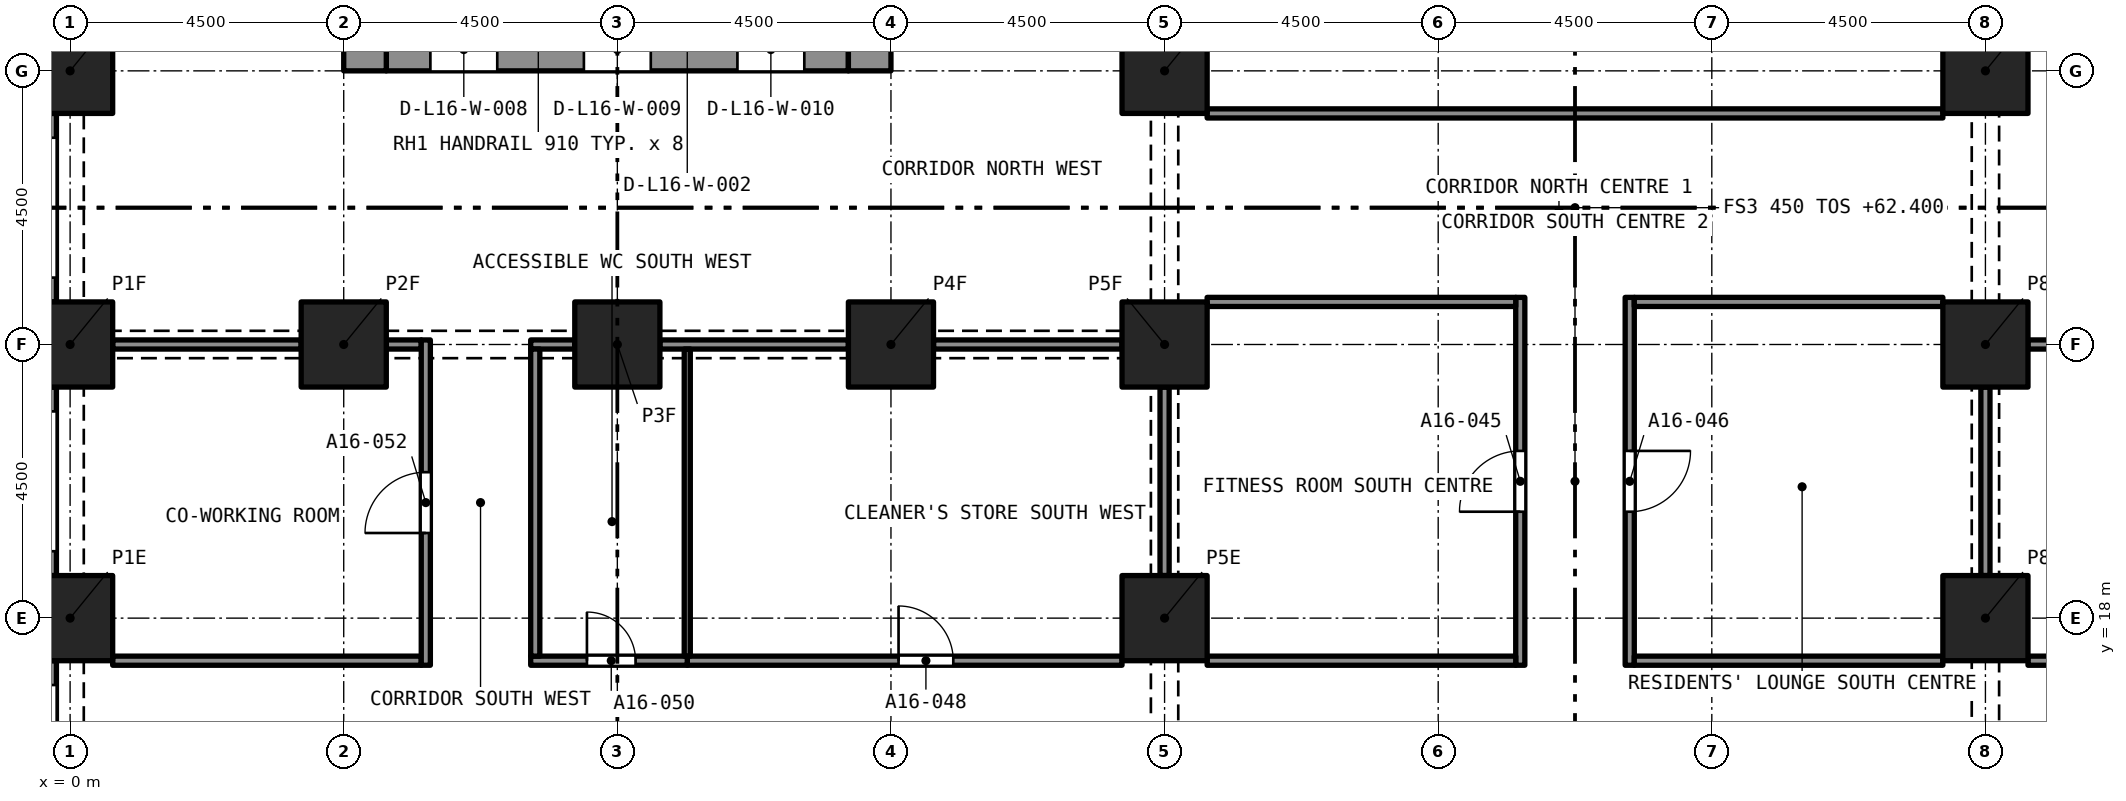
"""IFC4 building model, lengths in metres.
Left out: names, types, materials, properties, quantities, classifications, styles, units other than length and angle.
Written with IfcOpenShell. Run it as: python <this file> out.ifc"""

import sys

from ifc_helpers import new_model, si_unit, direction, frame, frame_2d, origin, origin_2d, place, context, subcontext, project, spatial, rectangle, extrude, element, fill, save


model = new_model("IFC4")
c1 = context("Model", 3, precision=1e-05, world=origin(), true_north=direction((0.0, 1.0)))
c2 = subcontext(c1, "Body", "Model", "MODEL_VIEW")
j1 = project(units=[si_unit("LENGTHUNIT", "METRE"), si_unit("PLANEANGLEUNIT", "RADIAN")], contexts=[c1])
p1 = place(None, origin())
s1 = spatial("IfcSite", under=j1, at=p1, CompositionType="ELEMENT")
p2 = place(p1, origin())
s2 = spatial("IfcBuilding", under=s1, at=p2, CompositionType="ELEMENT")
p3 = place(p2, frame((0.0, 0.0, 62.4)))
s3 = spatial("IfcBuildingStorey", under=s2, at=p3, CompositionType="ELEMENT", Elevation=62.4)
for number, where, z_axis, x_axis in (
    (1, (0.0, 18.0, 0.0), (0.0, 0.0, 1.0), (1.0, 0.0, 0.0)),
    (2, (18.0, 18.0, 0.0), (0.0, 0.0, 1.0), (1.0, 0.0, 0.0)),
    (3, (31.5, 18.0, 0.0), (0.0, 0.0, 1.0), (1.0, 0.0, 0.0)),
    (4, (0.0, 22.5, 0.0), (0.0, 0.0, 1.0), (1.0, 0.0, 0.0)),
    (5, (4.5, 22.5, 0.0), (0.0, 0.0, 1.0), (1.0, 0.0, 0.0)),
    (6, (9.0, 22.5, 0.0), (0.0, 0.0, 1.0), (1.0, 0.0, 0.0)),
    (7, (13.5, 22.5, 0.0), (0.0, 0.0, 1.0), (1.0, 0.0, 0.0)),
    (8, (18.0, 22.5, 0.0), (0.0, 0.0, 1.0), (1.0, 0.0, 0.0)),
    (9, (31.5, 22.5, 0.0), (0.0, 0.0, 1.0), (1.0, 0.0, 0.0)),
    (10, (0.0, 27.0, 0.0), (0.0, 0.0, 1.0), (1.0, 0.0, 0.0)),
    (11, (18.0, 27.0, 0.0), (0.0, 0.0, 1.0), (1.0, 0.0, 0.0)),
    (12, (31.5, 27.0, 0.0), (0.0, 0.0, 1.0), (1.0, 0.0, 0.0)),
):
    element("IfcColumn", number, at=place(p3, frame(where, z_axis=z_axis, x_axis=x_axis)), inside=s3, PredefinedType="COLUMN", context=c2, shape_type="SweptSolid", body=[
        extrude(rectangle(XDim=1.4, YDim=1.4, at=origin_2d()), origin(), (0.0, 0.0, 1.0), 3.2),
    ])
p4 = place(p3, frame((5.2, 27.35, 0.0), z_axis=(0.0, 0.0, 1.0), x_axis=(1.0, 0.0, 0.0)))
e13 = element("IfcWall", 13, at=p4, inside=s3, PredefinedType="SOLIDWALL", context=c2, shape_type="SweptSolid", body=[
    extrude(rectangle(XDim=7.6, YDim=0.7, at=frame_2d((3.8, 0.0))), origin(), (0.0, 0.0, 1.0), 3.2),
])
p5 = place(p4, frame((0.725, 0.0, 0.0)))
e14 = element("IfcOpeningElement", 14, at=p5, cuts=e13, PredefinedType="OPENING", context=c2, shape_type="SweptSolid", body=[
    extrude(rectangle(XDim=1.1, YDim=2.1, at=frame_2d((0.55, 1.05))), frame((0.0, 0.36, 0.0), z_axis=(0.0, -1.0, 0.0), x_axis=(1.0, 0.0, 0.0)), (0.0, 0.0, 1.0), 0.72),
])
p6 = place(p4, frame((3.25, 0.0, 0.0)))
e15 = element("IfcOpeningElement", 15, at=p6, cuts=e13, PredefinedType="OPENING", context=c2, shape_type="SweptSolid", body=[
    extrude(rectangle(XDim=1.1, YDim=2.1, at=frame_2d((0.55, 1.05))), frame((0.0, 0.36, 0.0), z_axis=(0.0, -1.0, 0.0), x_axis=(1.0, 0.0, 0.0)), (0.0, 0.0, 1.0), 0.72),
])
p7 = place(p4, frame((5.775, 0.0, 0.0)))
e16 = element("IfcOpeningElement", 16, at=p7, cuts=e13, PredefinedType="OPENING", context=c2, shape_type="SweptSolid", body=[
    extrude(rectangle(XDim=1.1, YDim=2.1, at=frame_2d((0.55, 1.05))), frame((0.0, 0.36, 0.0), z_axis=(0.0, -1.0, 0.0), x_axis=(1.0, 0.0, 0.0)), (0.0, 0.0, 1.0), 0.72),
])
p8 = place(p3, frame((4.85, 27.0, 0.0), z_axis=(0.0, 0.0, 1.0), x_axis=(0.0, 1.0, 0.0)))
e17 = element("IfcWall", 17, at=p8, inside=s3, PredefinedType="SOLIDWALL", context=c2, shape_type="SweptSolid", body=[
    extrude(rectangle(XDim=13.5, YDim=0.7, at=frame_2d((6.75, 0.0))), origin(), (0.0, 0.0, 1.0), 3.2),
])
p9 = place(p8, frame((8.95, 0.0, 0.0)))
e18 = element("IfcOpeningElement", 18, at=p9, cuts=e17, PredefinedType="OPENING", context=c2, shape_type="SweptSolid", body=[
    extrude(rectangle(XDim=1.2, YDim=2.1, at=frame_2d((0.6, 1.05))), frame((0.0, 0.36, 0.0), z_axis=(0.0, -1.0, 0.0), x_axis=(1.0, 0.0, 0.0)), (0.0, 0.0, 1.0), 0.72),
])
p10 = place(p3, frame((13.15, 27.0, 0.0), z_axis=(0.0, 0.0, 1.0), x_axis=(0.0, 1.0, 0.0)))
e19 = element("IfcWall", 19, at=p10, inside=s3, PredefinedType="SOLIDWALL", context=c2, shape_type="SweptSolid", body=[
    extrude(rectangle(XDim=13.5, YDim=0.7, at=frame_2d((6.75, 0.0))), origin(), (0.0, 0.0, 1.0), 3.2),
])
p11 = place(p10, frame((11.1, 0.0, 0.0)))
e20 = element("IfcOpeningElement", 20, at=p11, cuts=e19, PredefinedType="OPENING", context=c2, shape_type="SweptSolid", body=[
    extrude(rectangle(XDim=1.1, YDim=2.1, at=frame_2d((0.55, 1.05))), frame((0.0, 0.36, 0.0), z_axis=(0.0, -1.0, 0.0), x_axis=(1.0, 0.0, 0.0)), (0.0, 0.0, 1.0), 0.72),
])
p12 = place(p10, frame((8.95, 0.0, 0.0)))
e21 = element("IfcOpeningElement", 21, at=p12, cuts=e19, PredefinedType="OPENING", context=c2, shape_type="SweptSolid", body=[
    extrude(rectangle(XDim=1.2, YDim=2.1, at=frame_2d((0.6, 1.05))), frame((0.0, 0.36, 0.0), z_axis=(0.0, -1.0, 0.0), x_axis=(1.0, 0.0, 0.0)), (0.0, 0.0, 1.0), 0.72),
])
p13 = place(p3, frame((-0.375, 23.2, 0.0), z_axis=(0.0, 0.0, 1.0), x_axis=(0.0, 1.0, 0.0)))
e22 = element("IfcWall", 22, at=p13, inside=s3, PredefinedType="SOLIDWALL", context=c2, shape_type="SweptSolid", body=[
    extrude(rectangle(XDim=3.1, YDim=0.3, at=frame_2d((1.55, 0.0))), origin(), (0.0, 0.0, 1.0), 3.2),
])
p14 = place(p13, frame((0.4, 0.0, 0.45)))
e23 = element("IfcOpeningElement", 23, at=p14, cuts=e22, PredefinedType="OPENING", context=c2, shape_type="SweptSolid", body=[
    extrude(rectangle(XDim=2.3, YDim=1.95, at=frame_2d((1.15, 0.975))), frame((0.0, 0.16, 0.0), z_axis=(0.0, -1.0, 0.0), x_axis=(1.0, 0.0, 0.0)), (0.0, 0.0, 1.0), 0.32),
])
p15 = place(p3, frame((-0.375, 18.7, 0.0), z_axis=(0.0, 0.0, 1.0), x_axis=(0.0, 1.0, 0.0)))
e24 = element("IfcWall", 24, at=p15, inside=s3, PredefinedType="SOLIDWALL", context=c2, shape_type="SweptSolid", body=[
    extrude(rectangle(XDim=3.1, YDim=0.3, at=frame_2d((1.55, 0.0))), origin(), (0.0, 0.0, 1.0), 3.2),
])
p16 = place(p15, frame((0.4, 0.0, 0.45)))
e25 = element("IfcOpeningElement", 25, at=p16, cuts=e24, PredefinedType="OPENING", context=c2, shape_type="SweptSolid", body=[
    extrude(rectangle(XDim=2.3, YDim=1.95, at=frame_2d((1.15, 0.975))), frame((0.0, 0.16, 0.0), z_axis=(0.0, -1.0, 0.0), x_axis=(1.0, 0.0, 0.0)), (0.0, 0.0, 1.0), 0.32),
])
p17 = place(p3, frame((-0.375, 14.2, 0.0), z_axis=(0.0, 0.0, 1.0), x_axis=(0.0, 1.0, 0.0)))
e26 = element("IfcWall", 26, at=p17, inside=s3, PredefinedType="SOLIDWALL", context=c2, shape_type="SweptSolid", body=[
    extrude(rectangle(XDim=3.1, YDim=0.3, at=frame_2d((1.55, 0.0))), origin(), (0.0, 0.0, 1.0), 3.2),
])
p18 = place(p17, frame((0.4, 0.0, 0.45)))
e27 = element("IfcOpeningElement", 27, at=p18, cuts=e26, PredefinedType="OPENING", context=c2, shape_type="SweptSolid", body=[
    extrude(rectangle(XDim=2.3, YDim=1.95, at=frame_2d((1.15, 0.975))), frame((0.0, 0.16, 0.0), z_axis=(0.0, -1.0, 0.0), x_axis=(1.0, 0.0, 0.0)), (0.0, 0.0, 1.0), 0.32),
])
p19 = place(p3, frame((23.85, 17.225, 0.0), z_axis=(0.0, 0.0, 1.0), x_axis=(0.0, 1.0, 0.0)))
e28 = element("IfcWall", 28, at=p19, inside=s3, PredefinedType="PARTITIONING", context=c2, shape_type="SweptSolid", body=[
    extrude(rectangle(XDim=6.05, YDim=0.15, at=frame_2d((3.025, 0.0))), origin(), (0.0, 0.0, 1.0), 2.75),
])
p20 = place(p19, frame((2.525, 0.0, 0.0)))
e29 = element("IfcOpeningElement", 29, at=p20, cuts=e28, PredefinedType="OPENING", context=c2, shape_type="SweptSolid", body=[
    extrude(rectangle(XDim=1.0, YDim=2.1, at=frame_2d((0.5, 1.05))), frame((0.0, 0.085, 0.0), z_axis=(0.0, -1.0, 0.0), x_axis=(1.0, 0.0, 0.0)), (0.0, 0.0, 1.0), 0.17),
])
p21 = place(p3, frame((25.65, 23.275, 0.0), z_axis=(0.0, 0.0, 1.0), x_axis=(0.0, -1.0, 0.0)))
e30 = element("IfcWall", 30, at=p21, inside=s3, PredefinedType="PARTITIONING", context=c2, shape_type="SweptSolid", body=[
    extrude(rectangle(XDim=6.05, YDim=0.15, at=frame_2d((3.025, 0.0))), origin(), (0.0, 0.0, 1.0), 2.75),
])
p22 = place(p21, frame((2.525, 0.0, 0.0)))
e31 = element("IfcOpeningElement", 31, at=p22, cuts=e30, PredefinedType="OPENING", context=c2, shape_type="SweptSolid", body=[
    extrude(rectangle(XDim=1.0, YDim=2.1, at=frame_2d((0.5, 1.05))), frame((0.0, 0.085, 0.0), z_axis=(0.0, -1.0, 0.0), x_axis=(1.0, 0.0, 0.0)), (0.0, 0.0, 1.0), 0.17),
])
for number, where, z_axis, x_axis in (
    (32, (18.7, 17.3, 0.0), (0.0, 0.0, 1.0), (1.0, 0.0, 0.0)),
    (33, (25.725, 17.3, 0.0), (0.0, 0.0, 1.0), (1.0, 0.0, 0.0)),
):
    element("IfcWall", number, at=place(p3, frame(where, z_axis=z_axis, x_axis=x_axis)), inside=s3, PredefinedType="PARTITIONING", context=c2, shape_type="SweptSolid", body=[
        extrude(rectangle(XDim=5.075, YDim=0.15, at=frame_2d((2.538, 0.0))), origin(), (0.0, 0.0, 1.0), 2.75),
    ])
p23 = place(p3, frame((32.2, 17.3, 0.0), z_axis=(0.0, 0.0, 1.0), x_axis=(1.0, 0.0, 0.0)))
e34 = element("IfcWall", 34, at=p23, inside=s3, PredefinedType="PARTITIONING", context=c2, shape_type="SweptSolid", body=[
    extrude(rectangle(XDim=7.15, YDim=0.15, at=frame_2d((3.575, 0.0))), origin(), (0.0, 0.0, 1.0), 2.9),
])
p24 = place(p23, frame((2.775, 0.0, 0.0)))
e35 = element("IfcOpeningElement", 35, at=p24, cuts=e34, PredefinedType="OPENING", context=c2, shape_type="SweptSolid", body=[
    extrude(rectangle(XDim=0.9, YDim=2.1, at=frame_2d((0.45, 1.05))), frame((0.0, 0.085, 0.0), z_axis=(0.0, -1.0, 0.0), x_axis=(1.0, 0.0, 0.0)), (0.0, 0.0, 1.0), 0.17),
])
p25 = place(p3, frame((10.15, 17.3, 0.0), z_axis=(0.0, 0.0, 1.0), x_axis=(1.0, 0.0, 0.0)))
e36 = element("IfcWall", 36, at=p25, inside=s3, PredefinedType="PARTITIONING", context=c2, shape_type="SweptSolid", body=[
    extrude(rectangle(XDim=7.15, YDim=0.15, at=frame_2d((3.575, 0.0))), origin(), (0.0, 0.0, 1.0), 2.9),
])
p26 = place(p25, frame((3.475, 0.0, 0.0)))
e37 = element("IfcOpeningElement", 37, at=p26, cuts=e36, PredefinedType="OPENING", context=c2, shape_type="SweptSolid", body=[
    extrude(rectangle(XDim=0.9, YDim=2.1, at=frame_2d((0.45, 1.05))), frame((0.0, 0.085, 0.0), z_axis=(0.0, -1.0, 0.0), x_axis=(1.0, 0.0, 0.0)), (0.0, 0.0, 1.0), 0.17),
])
p27 = place(p3, frame((7.575, 17.3, 0.0), z_axis=(0.0, 0.0, 1.0), x_axis=(1.0, 0.0, 0.0)))
e38 = element("IfcWall", 38, at=p27, inside=s3, PredefinedType="PARTITIONING", context=c2, shape_type="SweptSolid", body=[
    extrude(rectangle(XDim=2.575, YDim=0.15, at=frame_2d((1.288, 0.0))), origin(), (0.0, 0.0, 1.0), 2.9),
])
p28 = place(p27, frame((0.925, 0.0, 0.0)))
e39 = element("IfcOpeningElement", 39, at=p28, cuts=e38, PredefinedType="OPENING", context=c2, shape_type="SweptSolid", body=[
    extrude(rectangle(XDim=0.8, YDim=2.1, at=frame_2d((0.4, 1.05))), frame((0.0, 0.085, 0.0), z_axis=(0.0, -1.0, 0.0), x_axis=(1.0, 0.0, 0.0)), (0.0, 0.0, 1.0), 0.17),
])
p29 = place(p3, frame((0.7, 17.3, 0.0), z_axis=(0.0, 0.0, 1.0), x_axis=(1.0, 0.0, 0.0)))
e40 = element("IfcWall", 40, at=p29, inside=s3, PredefinedType="PARTITIONING", context=c2, shape_type="SweptSolid", body=[
    extrude(rectangle(XDim=5.075, YDim=0.15, at=frame_2d((2.538, 0.0))), origin(), (0.0, 0.0, 1.0), 2.9),
])
p30 = place(p3, frame((18.7, 26.3, 0.0), z_axis=(0.0, 0.0, 1.0), x_axis=(1.0, 0.0, 0.0)))
e41 = element("IfcWall", 41, at=p30, inside=s3, PredefinedType="PARTITIONING", context=c2, shape_type="SweptSolid", body=[
    extrude(rectangle(XDim=12.1, YDim=0.15, at=frame_2d((6.05, 0.0))), origin(), (0.0, 0.0, 1.0), 2.75),
])
p31 = place(p3, frame((18.7, 23.2, 0.0), z_axis=(0.0, 0.0, 1.0), x_axis=(1.0, 0.0, 0.0)))
e42 = element("IfcWall", 42, at=p31, inside=s3, PredefinedType="PARTITIONING", context=c2, shape_type="SweptSolid", body=[
    extrude(rectangle(XDim=5.075, YDim=0.15, at=frame_2d((2.538, 0.0))), origin(), (0.0, 0.0, 1.0), 2.75),
])
p32 = place(p3, frame((18.0, 18.7, 0.0), z_axis=(0.0, 0.0, 1.0), x_axis=(0.0, 1.0, 0.0)))
e43 = element("IfcWall", 43, at=p32, inside=s3, PredefinedType="PARTITIONING", context=c2, shape_type="SweptSolid", body=[
    extrude(rectangle(XDim=3.1, YDim=0.15, at=frame_2d((1.55, 0.0))), origin(), (0.0, 0.0, 1.0), 2.38),
])
p33 = place(p3, frame((25.725, 23.2, 0.0), z_axis=(0.0, 0.0, 1.0), x_axis=(1.0, 0.0, 0.0)))
e44 = element("IfcWall", 44, at=p33, inside=s3, PredefinedType="PARTITIONING", context=c2, shape_type="SweptSolid", body=[
    extrude(rectangle(XDim=5.075, YDim=0.15, at=frame_2d((2.538, 0.0))), origin(), (0.0, 0.0, 1.0), 2.75),
])
p34 = place(p3, frame((31.5, 18.7, 0.0), z_axis=(0.0, 0.0, 1.0), x_axis=(0.0, 1.0, 0.0)))
e45 = element("IfcWall", 45, at=p34, inside=s3, PredefinedType="PARTITIONING", context=c2, shape_type="SweptSolid", body=[
    extrude(rectangle(XDim=3.1, YDim=0.15, at=frame_2d((1.55, 0.0))), origin(), (0.0, 0.0, 1.0), 2.38),
])
p35 = place(p3, frame((32.2, 22.5, 0.0), z_axis=(0.0, 0.0, 1.0), x_axis=(1.0, 0.0, 0.0)))
e46 = element("IfcWall", 46, at=p35, inside=s3, PredefinedType="PARTITIONING", context=c2, shape_type="SweptSolid", body=[
    extrude(rectangle(XDim=9.725, YDim=0.15, at=frame_2d((4.863, 0.0))), origin(), (0.0, 0.0, 1.0), 2.9),
])
for number, where, z_axis, x_axis in (
    (47, (14.2, 22.5, 0.0), (0.0, 0.0, 1.0), (1.0, 0.0, 0.0)),
    (48, (9.7, 22.5, 0.0), (0.0, 0.0, 1.0), (1.0, 0.0, 0.0)),
):
    element("IfcWall", number, at=place(p3, frame(where, z_axis=z_axis, x_axis=x_axis)), inside=s3, PredefinedType="PARTITIONING", context=c2, shape_type="SweptSolid", body=[
        extrude(rectangle(XDim=3.1, YDim=0.15, at=frame_2d((1.55, 0.0))), origin(), (0.0, 0.0, 1.0), 2.38),
    ])
p36 = place(p3, frame((7.575, 22.5, 0.0), z_axis=(0.0, 0.0, 1.0), x_axis=(1.0, 0.0, 0.0)))
e49 = element("IfcWall", 49, at=p36, inside=s3, PredefinedType="PARTITIONING", context=c2, shape_type="SweptSolid", body=[
    extrude(rectangle(XDim=0.725, YDim=0.15, at=frame_2d((0.363, 0.0))), origin(), (0.0, 0.0, 1.0), 2.38),
])
p37 = place(p3, frame((5.2, 22.5, 0.0), z_axis=(0.0, 0.0, 1.0), x_axis=(1.0, 0.0, 0.0)))
e50 = element("IfcWall", 50, at=p37, inside=s3, PredefinedType="PARTITIONING", context=c2, shape_type="SweptSolid", body=[
    extrude(rectangle(XDim=0.575, YDim=0.15, at=frame_2d((0.288, 0.0))), origin(), (0.0, 0.0, 1.0), 2.38),
])
p38 = place(p3, frame((0.7, 22.5, 0.0), z_axis=(0.0, 0.0, 1.0), x_axis=(1.0, 0.0, 0.0)))
e51 = element("IfcWall", 51, at=p38, inside=s3, PredefinedType="PARTITIONING", context=c2, shape_type="SweptSolid", body=[
    extrude(rectangle(XDim=3.1, YDim=0.15, at=frame_2d((1.55, 0.0))), origin(), (0.0, 0.0, 1.0), 2.38),
])
p39 = place(p3, frame((7.65, 17.375, 0.0), z_axis=(0.0, 0.0, 1.0), x_axis=(0.0, 1.0, 0.0)))
e52 = element("IfcWall", 52, at=p39, inside=s3, PredefinedType="PARTITIONING", context=c2, shape_type="SweptSolid", body=[
    extrude(rectangle(XDim=5.05, YDim=0.15, at=frame_2d((2.525, 0.0))), origin(), (0.0, 0.0, 1.0), 2.9),
])
p40 = place(p3, frame((5.85, 17.225, 0.0), z_axis=(0.0, 0.0, 1.0), x_axis=(0.0, 1.0, 0.0)))
e53 = element("IfcWall", 53, at=p40, inside=s3, PredefinedType="PARTITIONING", context=c2, shape_type="SweptSolid", body=[
    extrude(rectangle(XDim=5.35, YDim=0.15, at=frame_2d((2.675, 0.0))), origin(), (0.0, 0.0, 1.0), 2.9),
])
p41 = place(p40, frame((2.175, 0.0, 0.0)))
e54 = element("IfcOpeningElement", 54, at=p41, cuts=e53, PredefinedType="OPENING", context=c2, shape_type="SweptSolid", body=[
    extrude(rectangle(XDim=1.0, YDim=2.1, at=frame_2d((0.5, 1.05))), frame((0.0, 0.085, 0.0), z_axis=(0.0, -1.0, 0.0), x_axis=(1.0, 0.0, 0.0)), (0.0, 0.0, 1.0), 0.17),
])
p42 = place(p3, frame((10.15, 17.375, 0.0), z_axis=(0.0, 0.0, 1.0), x_axis=(0.0, 1.0, 0.0)))
e55 = element("IfcWall", 55, at=p42, inside=s3, PredefinedType="PARTITIONING", context=c2, shape_type="SweptSolid", body=[
    extrude(rectangle(XDim=5.05, YDim=0.1, at=frame_2d((2.525, 0.0))), origin(), (0.0, 0.0, 1.0), 2.9),
])
p43 = place(p20, origin())
e56 = element("IfcDoor", 56, at=p43, inside=s3, OperationType="SINGLE_SWING_RIGHT", PredefinedType="DOOR", context=c2, shape_type="SweptSolid", body=[
    extrude(rectangle(XDim=1.0, YDim=2.1, at=frame_2d((0.5, 1.05))), frame((0.0, 0.025, 0.0), z_axis=(0.0, -1.0, 0.0), x_axis=(1.0, 0.0, 0.0)), (0.0, 0.0, 1.0), 0.05),
])
fill(e29, e56)
p44 = place(p22, origin())
e57 = element("IfcDoor", 57, at=p44, inside=s3, OperationType="SINGLE_SWING_RIGHT", PredefinedType="DOOR", context=c2, shape_type="SweptSolid", body=[
    extrude(rectangle(XDim=1.0, YDim=2.1, at=frame_2d((0.5, 1.05))), frame((0.0, 0.025, 0.0), z_axis=(0.0, -1.0, 0.0), x_axis=(1.0, 0.0, 0.0)), (0.0, 0.0, 1.0), 0.05),
])
fill(e31, e57)
p45 = place(p26, origin())
e58 = element("IfcDoor", 58, at=p45, inside=s3, OperationType="SINGLE_SWING_RIGHT", PredefinedType="DOOR", context=c2, shape_type="SweptSolid", body=[
    extrude(rectangle(XDim=0.9, YDim=2.1, at=frame_2d((0.45, 1.05))), frame((0.0, 0.025, 0.0), z_axis=(0.0, -1.0, 0.0), x_axis=(1.0, 0.0, 0.0)), (0.0, 0.0, 1.0), 0.05),
])
fill(e37, e58)
p46 = place(p28, origin())
e59 = element("IfcDoor", 59, at=p46, inside=s3, OperationType="SINGLE_SWING_RIGHT", PredefinedType="DOOR", context=c2, shape_type="SweptSolid", body=[
    extrude(rectangle(XDim=0.8, YDim=2.1, at=frame_2d((0.4, 1.05))), frame((0.0, 0.025, 0.0), z_axis=(0.0, -1.0, 0.0), x_axis=(1.0, 0.0, 0.0)), (0.0, 0.0, 1.0), 0.05),
])
fill(e39, e59)
p47 = place(p41, origin())
e60 = element("IfcDoor", 60, at=p47, inside=s3, OperationType="SINGLE_SWING_LEFT", PredefinedType="DOOR", context=c2, shape_type="SweptSolid", body=[
    extrude(rectangle(XDim=1.0, YDim=2.1, at=frame_2d((0.5, 1.05))), frame((0.0, 0.025, 0.0), z_axis=(0.0, -1.0, 0.0), x_axis=(1.0, 0.0, 0.0)), (0.0, 0.0, 1.0), 0.05),
])
fill(e54, e60)
save(model, sys.argv[1])
